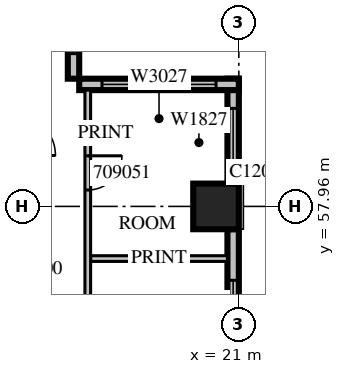
"""IFC4 building model, lengths in metres.
Left out: names, types, materials, properties, quantities, classifications, styles, units other than length and angle.
Written with IfcOpenShell. Run it as: python <this file> out.ifc"""

import sys

from ifc_helpers import new_model, si_unit, direction, frame, frame_2d, origin, origin_2d, place, context, subcontext, project, spatial, rectangle, extrude, source, transform, mapped, element, fill, save


model = new_model("IFC4")
c1 = context("Model", 3, precision=1e-05, world=origin(), true_north=direction((0.0, 1.0)))
c2 = subcontext(c1, "Body", "Model", "MODEL_VIEW")
j1 = project(units=[si_unit("LENGTHUNIT", "METRE"), si_unit("PLANEANGLEUNIT", "RADIAN")], contexts=[c1])
p1 = place(None, origin())
s1 = spatial("IfcSite", under=j1, at=p1, CompositionType="ELEMENT")
p2 = place(p1, origin())
s2 = spatial("IfcBuilding", under=s1, at=p2, CompositionType="ELEMENT")
p3 = place(p2, frame((0.0, 0.0, 48.9)))
s3 = spatial("IfcBuildingStorey", under=s2, at=p3, CompositionType="ELEMENT", Elevation=48.9)
m1 = source(origin(), c2, "Body", "SweptSolid", [
    extrude(rectangle(XDim=1.2, YDim=1.2, at=origin_2d()), origin(), (0.0, 0.0, 1.0), 4.2),
])
p4 = place(p3, frame((20.4, 57.96, 0.0), z_axis=(0.0, 0.0, 1.0), x_axis=(1.0, 0.0, 0.0)))
e1 = element("IfcColumn", 1, at=p4, inside=s3, PredefinedType="COLUMN", context=c2, shape_type="MappedRepresentation", body=[
    mapped(m1, transform((0.0, 0.0, 0.0), scale=1.0)),
])
m2 = source(origin(), c2, "Body", "SweptSolid", [
    extrude(rectangle(XDim=4.68, YDim=0.3, at=frame_2d((2.34, 0.0))), origin(), (0.0, 0.0, 1.0), 3.8),
])
p5 = place(p3, frame((20.85, 52.68, 0.0), z_axis=(0.0, 0.0, 1.0), x_axis=(0.0, 1.0, 0.0)))
e2 = element("IfcWall", 2, at=p5, inside=s3, PredefinedType="STANDARD", context=c2, shape_type="MappedRepresentation", body=[
    mapped(m2, transform((0.0, 0.0, 0.0), scale=1.0)),
])
m3 = source(origin(), c2, "Body", "SweptSolid", [
    extrude(rectangle(XDim=2.4, YDim=2.7, at=frame_2d((1.2, 1.35))), frame((0.0, 0.16, 0.0), z_axis=(0.0, -1.0, 0.0), x_axis=(1.0, 0.0, 0.0)), (0.0, 0.0, 1.0), 0.32),
])
p6 = place(p5, frame((0.936, 0.0, 0.6)))
e3 = element("IfcOpeningElement", 3, at=p6, cuts=e2, PredefinedType="OPENING", context=c2, shape_type="MappedRepresentation", body=[
    mapped(m3, transform((0.0, 0.0, 0.0), scale=1.0)),
])
m4 = source(origin(), c2, "Body", "SweptSolid", [
    extrude(rectangle(XDim=2.76, YDim=0.3, at=frame_2d((1.38, 0.0))), origin(), (0.0, 0.0, 1.0), 3.8),
])
p7 = place(p3, frame((20.85, 58.56, 0.0), z_axis=(0.0, 0.0, 1.0), x_axis=(0.0, 1.0, 0.0)))
e4 = element("IfcWall", 4, at=p7, inside=s3, PredefinedType="STANDARD", context=c2, shape_type="MappedRepresentation", body=[
    mapped(m4, transform((0.0, 0.0, 0.0), scale=1.0)),
])
m5 = source(origin(), c2, "Body", "SweptSolid", [
    extrude(rectangle(XDim=1.8, YDim=2.7, at=frame_2d((0.9, 1.35))), frame((0.0, 0.16, 0.0), z_axis=(0.0, -1.0, 0.0), x_axis=(1.0, 0.0, 0.0)), (0.0, 0.0, 1.0), 0.32),
])
p8 = place(p7, frame((0.18, 0.0, 0.6)))
e5 = element("IfcOpeningElement", 5, at=p8, cuts=e4, PredefinedType="OPENING", context=c2, shape_type="MappedRepresentation", body=[
    mapped(m5, transform((0.0, 0.0, 0.0), scale=1.0)),
])
m6 = source(origin(), c2, "Body", "SweptSolid", [
    extrude(rectangle(XDim=4.2, YDim=0.3, at=frame_2d((2.1, 0.0))), origin(), (0.0, 0.0, 1.0), 3.8),
])
p9 = place(p3, frame((21.0, 61.17, 0.0), z_axis=(0.0, 0.0, 1.0), x_axis=(-1.0, 0.0, 0.0)))
e6 = element("IfcWall", 6, at=p9, inside=s3, PredefinedType="STANDARD", context=c2, shape_type="MappedRepresentation", body=[
    mapped(m6, transform((0.0, 0.0, 0.0), scale=1.0)),
])
m7 = source(origin(), c2, "Body", "SweptSolid", [
    extrude(rectangle(XDim=3.0, YDim=2.7, at=frame_2d((1.5, 1.35))), frame((0.0, 0.16, 0.0), z_axis=(0.0, -1.0, 0.0), x_axis=(1.0, 0.0, 0.0)), (0.0, 0.0, 1.0), 0.32),
])
p10 = place(p9, frame((0.6, 0.0, 0.6)))
e7 = element("IfcOpeningElement", 7, at=p10, cuts=e6, PredefinedType="OPENING", context=c2, shape_type="MappedRepresentation", body=[
    mapped(m7, transform((0.0, 0.0, 0.0), scale=1.0)),
])
m8 = source(origin(), c2, "Body", "SweptSolid", [
    extrude(rectangle(XDim=2.52, YDim=0.3, at=frame_2d((1.26, 0.0))), origin(), (0.0, 0.0, 1.0), 3.8),
])
p11 = place(p3, frame((16.65, 61.32, 0.0), z_axis=(0.0, 0.0, 1.0), x_axis=(0.0, 1.0, 0.0)))
e8 = element("IfcWall", 8, at=p11, inside=s3, PredefinedType="STANDARD", context=c2, shape_type="MappedRepresentation", body=[
    mapped(m8, transform((0.0, 0.0, 0.0), scale=1.0)),
])
m9 = source(origin(), c2, "Body", "SweptSolid", [
    extrude(rectangle(XDim=1.2, YDim=2.7, at=frame_2d((0.6, 1.35))), frame((0.0, 0.16, 0.0), z_axis=(0.0, -1.0, 0.0), x_axis=(1.0, 0.0, 0.0)), (0.0, 0.0, 1.0), 0.32),
])
p12 = place(p11, frame((0.66, 0.0, 0.6)))
e9 = element("IfcOpeningElement", 9, at=p12, cuts=e8, PredefinedType="OPENING", context=c2, shape_type="MappedRepresentation", body=[
    mapped(m9, transform((0.0, 0.0, 0.0), scale=1.0)),
])
m10 = source(origin(), c2, "Body", "SweptSolid", [
    extrude(rectangle(XDim=3.6, YDim=0.15, at=frame_2d((1.8, 0.0))), origin(), (0.0, 0.0, 1.0), 3.8),
])
p13 = place(p3, frame((17.1, 56.587, 0.0), z_axis=(0.0, 0.0, 1.0), x_axis=(1.0, 0.0, 0.0)))
e10 = element("IfcWall", 10, at=p13, inside=s3, PredefinedType="PARTITIONING", context=c2, shape_type="MappedRepresentation", body=[
    mapped(m10, transform((0.0, 0.0, 0.0), scale=1.0)),
])
p14 = place(p3, frame((17.025, 61.02, 0.0), z_axis=(0.0, 0.0, 1.0), x_axis=(0.0, -1.0, 0.0)))
e11 = element("IfcWall", 11, at=p14, inside=s3, PredefinedType="PARTITIONING", context=c2, shape_type="SweptSolid", body=[
    extrude(rectangle(XDim=31.62, YDim=0.15, at=frame_2d((15.81, 0.0))), origin(), (0.0, 0.0, 1.0), 3.8),
])
m11 = source(origin(), c2, "Body", "SweptSolid", [
    extrude(rectangle(XDim=1.0, YDim=2.1, at=frame_2d((0.5, 1.05))), frame((0.0, 0.085, 0.0), z_axis=(0.0, -1.0, 0.0), x_axis=(1.0, 0.0, 0.0)), (0.0, 0.0, 1.0), 0.17),
])
p15 = place(p14, frame((29.263, 0.0, 0.0)))
e12 = element("IfcOpeningElement", 12, at=p15, cuts=e11, PredefinedType="OPENING", context=c2, shape_type="MappedRepresentation", body=[
    mapped(m11, transform((0.0, 0.0, 0.0), scale=1.0)),
])
p16 = place(p14, frame((25.951, 0.0, 0.0)))
e13 = element("IfcOpeningElement", 13, at=p16, cuts=e11, PredefinedType="OPENING", context=c2, shape_type="MappedRepresentation", body=[
    mapped(m11, transform((0.0, 0.0, 0.0), scale=1.0)),
])
p17 = place(p14, frame((23.608, 0.0, 0.0)))
e14 = element("IfcOpeningElement", 14, at=p17, cuts=e11, PredefinedType="OPENING", context=c2, shape_type="MappedRepresentation", body=[
    mapped(m11, transform((0.0, 0.0, 0.0), scale=1.0)),
])
p18 = place(p14, frame((20.863, 0.0, 0.0)))
e15 = element("IfcOpeningElement", 15, at=p18, cuts=e11, PredefinedType="OPENING", context=c2, shape_type="MappedRepresentation", body=[
    mapped(m11, transform((0.0, 0.0, 0.0), scale=1.0)),
])
p19 = place(p14, frame((17.551, 0.0, 0.0)))
e16 = element("IfcOpeningElement", 16, at=p19, cuts=e11, PredefinedType="OPENING", context=c2, shape_type="MappedRepresentation", body=[
    mapped(m11, transform((0.0, 0.0, 0.0), scale=1.0)),
])
p20 = place(p14, frame((15.208, 0.0, 0.0)))
e17 = element("IfcOpeningElement", 17, at=p20, cuts=e11, PredefinedType="OPENING", context=c2, shape_type="MappedRepresentation", body=[
    mapped(m11, transform((0.0, 0.0, 0.0), scale=1.0)),
])
m12 = source(origin(), c2, "Body", "SweptSolid", [
    extrude(rectangle(XDim=0.9, YDim=2.1, at=frame_2d((0.45, 1.05))), frame((0.0, 0.085, 0.0), z_axis=(0.0, -1.0, 0.0), x_axis=(1.0, 0.0, 0.0)), (0.0, 0.0, 1.0), 0.17),
])
p21 = place(p14, frame((12.677, 0.0, 0.0)))
e18 = element("IfcOpeningElement", 18, at=p21, cuts=e11, PredefinedType="OPENING", context=c2, shape_type="MappedRepresentation", body=[
    mapped(m12, transform((0.0, 0.0, 0.0), scale=1.0)),
])
p22 = place(p14, frame((9.737, 0.0, 0.0)))
e19 = element("IfcOpeningElement", 19, at=p22, cuts=e11, PredefinedType="OPENING", context=c2, shape_type="MappedRepresentation", body=[
    mapped(m12, transform((0.0, 0.0, 0.0), scale=1.0)),
])
p23 = place(p14, frame((6.236, 0.0, 0.0)))
e20 = element("IfcOpeningElement", 20, at=p23, cuts=e11, PredefinedType="OPENING", context=c2, shape_type="MappedRepresentation", body=[
    mapped(m12, transform((0.0, 0.0, 0.0), scale=1.0)),
])
p24 = place(p14, frame((1.729, 0.0, 0.0)))
e21 = element("IfcOpeningElement", 21, at=p24, cuts=e11, PredefinedType="OPENING", context=c2, shape_type="MappedRepresentation", body=[
    mapped(m12, transform((0.0, 0.0, 0.0), scale=1.0)),
])
m13 = source(origin(), c2, "Body", "SweptSolid", [
    extrude(rectangle(XDim=2.4, YDim=2.7, at=frame_2d((1.2, 1.35))), frame((0.0, 0.03, 0.0), z_axis=(0.0, -1.0, 0.0), x_axis=(1.0, 0.0, 0.0)), (0.0, 0.0, 1.0), 0.06),
])
p25 = place(p6, origin())
e22 = element("IfcWindow", 22, at=p25, inside=s3, PartitioningType="SINGLE_PANEL", PredefinedType="WINDOW", context=c2, shape_type="MappedRepresentation", body=[
    mapped(m13, transform((0.0, 0.0, 0.0), scale=1.0)),
])
fill(e3, e22)
m14 = source(origin(), c2, "Body", "SweptSolid", [
    extrude(rectangle(XDim=1.8, YDim=2.7, at=frame_2d((0.9, 1.35))), frame((0.0, 0.03, 0.0), z_axis=(0.0, -1.0, 0.0), x_axis=(1.0, 0.0, 0.0)), (0.0, 0.0, 1.0), 0.06),
])
p26 = place(p8, origin())
e23 = element("IfcWindow", 23, at=p26, inside=s3, PartitioningType="SINGLE_PANEL", PredefinedType="WINDOW", context=c2, shape_type="MappedRepresentation", body=[
    mapped(m14, transform((0.0, 0.0, 0.0), scale=1.0)),
])
fill(e5, e23)
m15 = source(origin(), c2, "Body", "SweptSolid", [
    extrude(rectangle(XDim=3.0, YDim=2.7, at=frame_2d((1.5, 1.35))), frame((0.0, 0.03, 0.0), z_axis=(0.0, -1.0, 0.0), x_axis=(1.0, 0.0, 0.0)), (0.0, 0.0, 1.0), 0.06),
])
p27 = place(p10, origin())
e24 = element("IfcWindow", 24, at=p27, inside=s3, PartitioningType="SINGLE_PANEL", PredefinedType="WINDOW", context=c2, shape_type="MappedRepresentation", body=[
    mapped(m15, transform((0.0, 0.0, 0.0), scale=1.0)),
])
fill(e7, e24)
m16 = source(origin(), c2, "Body", "SweptSolid", [
    extrude(rectangle(XDim=1.2, YDim=2.7, at=frame_2d((0.6, 1.35))), frame((0.0, 0.03, 0.0), z_axis=(0.0, -1.0, 0.0), x_axis=(1.0, 0.0, 0.0)), (0.0, 0.0, 1.0), 0.06),
])
p28 = place(p12, origin())
e25 = element("IfcWindow", 25, at=p28, inside=s3, PartitioningType="SINGLE_PANEL", PredefinedType="WINDOW", context=c2, shape_type="MappedRepresentation", body=[
    mapped(m16, transform((0.0, 0.0, 0.0), scale=1.0)),
])
fill(e9, e25)
m17 = source(origin(), c2, "Body", "SweptSolid", [
    extrude(rectangle(XDim=0.9, YDim=2.1, at=frame_2d((0.45, 1.05))), frame((0.0, 0.025, 0.0), z_axis=(0.0, -1.0, 0.0), x_axis=(1.0, 0.0, 0.0)), (0.0, 0.0, 1.0), 0.05),
])
p29 = place(p24, origin())
e26 = element("IfcDoor", 26, at=p29, inside=s3, OperationType="SINGLE_SWING_LEFT", PredefinedType="DOOR", context=c2, shape_type="MappedRepresentation", body=[
    mapped(m17, transform((0.0, 0.0, 0.0), scale=1.0)),
])
fill(e21, e26)
save(model, sys.argv[1])
